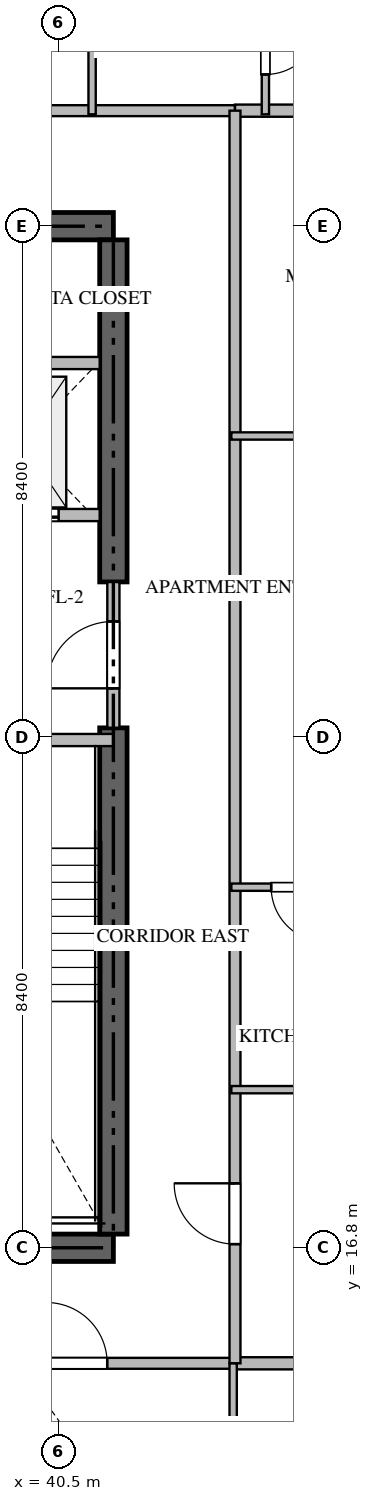
"""IFC4 building model, lengths in metres.
Left out: names, types, materials, properties, quantities, classifications, styles, units other than length and angle.
Written with IfcOpenShell. Run it as: python <this file> out.ifc"""

import sys

from ifc_helpers import new_model, si_unit, direction, frame, frame_2d, origin, place, context, subcontext, project, spatial, rectangle, extrude, source, transform, mapped, element, fill, save


model = new_model("IFC4")
c1 = context("Model", 3, precision=1e-05, world=origin(), true_north=direction((0.0, 1.0)))
c2 = subcontext(c1, "Body", "Model", "MODEL_VIEW")
j1 = project(units=[si_unit("LENGTHUNIT", "METRE"), si_unit("PLANEANGLEUNIT", "RADIAN")], contexts=[c1])
p1 = place(None, origin())
s1 = spatial("IfcSite", under=j1, at=p1, CompositionType="ELEMENT")
p2 = place(p1, origin())
s2 = spatial("IfcBuilding", under=s1, at=p2, CompositionType="ELEMENT")
p3 = place(p2, frame((0.0, 0.0, 71.7)))
s3 = spatial("IfcBuildingStorey", under=s2, at=p3, CompositionType="ELEMENT", Elevation=71.7)
for number, where, z_axis, x_axis in (
    (1, (23.4, 16.8, -0.26), (0.0, 0.0, 1.0), (1.0, 0.0, 0.0)),
    (2, (41.4, 33.6, -0.26), (0.0, 0.0, 1.0), (-1.0, 0.0, 0.0)),
):
    element("IfcWall", number, at=place(p3, frame(where, z_axis=z_axis, x_axis=x_axis)), inside=s3, PredefinedType="SHEAR", context=c2, shape_type="SweptSolid", body=[
        extrude(rectangle(XDim=18.0, YDim=0.45, at=frame_2d((9.0, 0.0))), origin(), (0.0, 0.0, 1.0), 3.748),
    ])
p4 = place(p3, frame((41.4, 17.025, -0.26), z_axis=(0.0, 0.0, 1.0), x_axis=(0.0, 1.0, 0.0)))
e3 = element("IfcWall", 3, at=p4, inside=s3, PredefinedType="SHEAR", context=c2, shape_type="SweptSolid", body=[
    extrude(rectangle(XDim=8.325, YDim=0.45, at=frame_2d((4.163, 0.0))), origin(), (0.0, 0.0, 1.0), 3.748),
])
p5 = place(p3, frame((41.4, 27.75, -0.26), z_axis=(0.0, 0.0, 1.0), x_axis=(0.0, 1.0, 0.0)))
e4 = element("IfcWall", 4, at=p5, inside=s3, PredefinedType="SHEAR", context=c2, shape_type="SweptSolid", body=[
    extrude(rectangle(XDim=5.625, YDim=0.45, at=frame_2d((2.812, 0.0))), origin(), (0.0, 0.0, 1.0), 3.748),
])
p6 = place(p3, frame((36.95, 25.15, 0.0), z_axis=(0.0, 0.0, 1.0), x_axis=(1.0, 0.0, 0.0)))
e5 = element("IfcWall", 5, at=p6, inside=s3, PredefinedType="STANDARD", context=c2, shape_type="SweptSolid", body=[
    extrude(rectangle(XDim=4.45, YDim=0.2, at=frame_2d((2.225, 0.0))), origin(), (0.0, 0.0, 1.0), 3.49),
])
p7 = place(p6, frame((1.65, 0.0, 0.0)))
e6 = element("IfcOpeningElement", 6, at=p7, cuts=e5, PredefinedType="OPENING", context=c2, shape_type="SweptSolid", body=[
    extrude(rectangle(XDim=1.1, YDim=2.15, at=frame_2d((0.55, 1.075))), frame((0.0, 0.11, 0.0), z_axis=(0.0, -1.0, 0.0), x_axis=(1.0, 0.0, 0.0)), (0.0, 0.0, 1.0), 0.22),
])
p8 = place(p3, frame((38.75, 28.85, 0.0), z_axis=(0.0, 0.0, 1.0), x_axis=(1.0, 0.0, 0.0)))
e7 = element("IfcWall", 7, at=p8, inside=s3, PredefinedType="STANDARD", context=c2, shape_type="SweptSolid", body=[
    extrude(rectangle(XDim=2.425, YDim=0.2, at=frame_2d((1.212, 0.0))), origin(), (0.0, 0.0, 1.0), 3.49),
])
p9 = place(p8, frame((0.55, 0.0, 0.0)))
e8 = element("IfcOpeningElement", 8, at=p9, cuts=e7, PredefinedType="OPENING", context=c2, shape_type="SweptSolid", body=[
    extrude(rectangle(XDim=1.2, YDim=2.2, at=frame_2d((0.6, 1.1))), frame((0.0, 0.11, 0.0), z_axis=(0.0, -1.0, 0.0), x_axis=(1.0, 0.0, 0.0)), (0.0, 0.0, 1.0), 0.22),
])
p10 = place(p3, frame((38.75, 31.35, 0.0), z_axis=(0.0, 0.0, 1.0), x_axis=(1.0, 0.0, 0.0)))
e9 = element("IfcWall", 9, at=p10, inside=s3, PredefinedType="STANDARD", context=c2, shape_type="SweptSolid", body=[
    extrude(rectangle(XDim=2.425, YDim=0.2, at=frame_2d((1.212, 0.0))), origin(), (0.0, 0.0, 1.0), 3.49),
])
p11 = place(p3, frame((41.4, 25.352, 0.0), z_axis=(0.0, 0.0, 1.0), x_axis=(0.0, 1.0, 0.0)))
e10 = element("IfcWall", 10, at=p11, inside=s3, PredefinedType="STANDARD", context=c2, shape_type="SweptSolid", body=[
    extrude(rectangle(XDim=2.396, YDim=0.2, at=frame_2d((1.198, 0.0))), origin(), (0.0, 0.0, 1.0), 3.49),
])
p12 = place(p11, frame((0.648, 0.0, 0.0)))
e11 = element("IfcOpeningElement", 11, at=p12, cuts=e10, PredefinedType="OPENING", context=c2, shape_type="SweptSolid", body=[
    extrude(rectangle(XDim=1.1, YDim=2.15, at=frame_2d((0.55, 1.075))), frame((0.0, 0.11, 0.0), z_axis=(0.0, -1.0, 0.0), x_axis=(1.0, 0.0, 0.0)), (0.0, 0.0, 1.0), 0.22),
])
for number, where, z_axis, x_axis in (
    (12, (43.4, 14.9, 0.0), (0.0, 0.0, 1.0), (1.0, 0.0, 0.0)),
    (13, (43.4, 35.5, 0.0), (0.0, 0.0, 1.0), (1.0, 0.0, 0.0)),
):
    element("IfcWall", number, at=place(p3, frame(where, z_axis=z_axis, x_axis=x_axis)), inside=s3, PredefinedType="PARTITIONING", context=c2, shape_type="SweptSolid", body=[
        extrude(rectangle(XDim=15.318, YDim=0.2, at=frame_2d((7.659, 0.0))), origin(), (0.0, 0.0, 1.0), 3.49),
    ])
p13 = place(p3, frame((21.402, 14.9, 0.0), z_axis=(0.0, 0.0, 1.0), x_axis=(1.0, 0.0, 0.0)))
e14 = element("IfcWall", 14, at=p13, inside=s3, PredefinedType="PARTITIONING", context=c2, shape_type="SweptSolid", body=[
    extrude(rectangle(XDim=21.996, YDim=0.18, at=frame_2d((10.998, 0.0))), origin(), (0.0, 0.0, 1.0), 3.49),
])
p14 = place(p13, frame((2.1, 0.0, 0.0)))
e15 = element("IfcOpeningElement", 15, at=p14, cuts=e14, PredefinedType="OPENING", context=c2, shape_type="SweptSolid", body=[
    extrude(rectangle(XDim=1.0, YDim=2.15, at=frame_2d((0.5, 1.075))), frame((0.0, 0.1, 0.0), z_axis=(0.0, -1.0, 0.0), x_axis=(1.0, 0.0, 0.0)), (0.0, 0.0, 1.0), 0.2),
])
p15 = place(p13, frame((6.173, 0.0, 0.0)))
e16 = element("IfcOpeningElement", 16, at=p15, cuts=e14, PredefinedType="OPENING", context=c2, shape_type="SweptSolid", body=[
    extrude(rectangle(XDim=1.0, YDim=2.15, at=frame_2d((0.5, 1.075))), frame((0.0, 0.1, 0.0), z_axis=(0.0, -1.0, 0.0), x_axis=(1.0, 0.0, 0.0)), (0.0, 0.0, 1.0), 0.2),
])
p16 = place(p13, frame((18.896, 0.0, 0.0)))
e17 = element("IfcOpeningElement", 17, at=p16, cuts=e14, PredefinedType="OPENING", context=c2, shape_type="SweptSolid", body=[
    extrude(rectangle(XDim=1.0, YDim=2.15, at=frame_2d((0.5, 1.075))), frame((0.0, 0.1, 0.0), z_axis=(0.0, -1.0, 0.0), x_axis=(1.0, 0.0, 0.0)), (0.0, 0.0, 1.0), 0.2),
])
p17 = place(p3, frame((21.402, 35.5, 0.0), z_axis=(0.0, 0.0, 1.0), x_axis=(1.0, 0.0, 0.0)))
e18 = element("IfcWall", 18, at=p17, inside=s3, PredefinedType="PARTITIONING", context=c2, shape_type="SweptSolid", body=[
    extrude(rectangle(XDim=21.996, YDim=0.18, at=frame_2d((10.998, 0.0))), origin(), (0.0, 0.0, 1.0), 3.49),
])
p18 = place(p17, frame((5.774, 0.0, 0.0)))
e19 = element("IfcOpeningElement", 19, at=p18, cuts=e18, PredefinedType="OPENING", context=c2, shape_type="SweptSolid", body=[
    extrude(rectangle(XDim=1.0, YDim=2.15, at=frame_2d((0.5, 1.075))), frame((0.0, 0.1, 0.0), z_axis=(0.0, -1.0, 0.0), x_axis=(1.0, 0.0, 0.0)), (0.0, 0.0, 1.0), 0.2),
])
p19 = place(p17, frame((16.272, 0.0, 0.0)))
e20 = element("IfcOpeningElement", 20, at=p19, cuts=e18, PredefinedType="OPENING", context=c2, shape_type="SweptSolid", body=[
    extrude(rectangle(XDim=1.0, YDim=2.15, at=frame_2d((0.5, 1.075))), frame((0.0, 0.1, 0.0), z_axis=(0.0, -1.0, 0.0), x_axis=(1.0, 0.0, 0.0)), (0.0, 0.0, 1.0), 0.2),
])
p20 = place(p3, frame((43.4, 14.9, 0.0), z_axis=(0.0, 0.0, 1.0), x_axis=(0.0, 1.0, 0.0)))
e21 = element("IfcWall", 21, at=p20, inside=s3, PredefinedType="PARTITIONING", context=c2, shape_type="SweptSolid", body=[
    extrude(rectangle(XDim=20.6, YDim=0.18, at=frame_2d((10.3, 0.0))), origin(), (0.0, 0.0, 1.0), 3.49),
])
p21 = place(p20, frame((1.96, 0.0, 0.0)))
e22 = element("IfcOpeningElement", 22, at=p21, cuts=e21, PredefinedType="OPENING", context=c2, shape_type="SweptSolid", body=[
    extrude(rectangle(XDim=1.0, YDim=2.15, at=frame_2d((0.5, 1.075))), frame((0.0, 0.1, 0.0), z_axis=(0.0, -1.0, 0.0), x_axis=(1.0, 0.0, 0.0)), (0.0, 0.0, 1.0), 0.2),
])
p22 = place(p3, frame((43.37, 12.15, 0.0), z_axis=(0.0, 0.0, 1.0), x_axis=(0.0, 1.0, 0.0)))
e23 = element("IfcWall", 23, at=p22, inside=s3, PredefinedType="PARTITIONING", context=c2, shape_type="SweptSolid", body=[
    extrude(rectangle(XDim=2.748, YDim=0.12, at=frame_2d((1.374, 0.0))), origin(), (0.0, 0.0, 1.0), 3.49),
])
p23 = place(p3, frame((41.05, 38.25, 0.0), z_axis=(0.0, 0.0, 1.0), x_axis=(0.0, -1.0, 0.0)))
e24 = element("IfcWall", 24, at=p23, inside=s3, PredefinedType="PARTITIONING", context=c2, shape_type="SweptSolid", body=[
    extrude(rectangle(XDim=2.81, YDim=0.12, at=frame_2d((1.405, 0.0))), origin(), (0.0, 0.0, 1.0), 3.49),
])
p24 = place(p3, frame((43.9, 37.65, 0.0), z_axis=(0.0, 0.0, 1.0), x_axis=(0.0, -1.0, 0.0)))
e25 = element("IfcWall", 25, at=p24, inside=s3, PredefinedType="PARTITIONING", context=c2, shape_type="SweptSolid", body=[
    extrude(rectangle(XDim=2.21, YDim=0.12, at=frame_2d((1.105, 0.0))), origin(), (0.0, 0.0, 1.0), 3.49),
])
p25 = place(p24, frame((0.655, 0.0, 0.0)))
e26 = element("IfcOpeningElement", 26, at=p25, cuts=e25, PredefinedType="OPENING", context=c2, shape_type="SweptSolid", body=[
    extrude(rectangle(XDim=0.9, YDim=2.1, at=frame_2d((0.45, 1.05))), frame((0.0, 0.07, 0.0), z_axis=(0.0, -1.0, 0.0), x_axis=(1.0, 0.0, 0.0)), (0.0, 0.0, 1.0), 0.14),
])
p26 = place(p3, frame((46.15, 19.4, 0.0), z_axis=(0.0, 0.0, 1.0), x_axis=(-1.0, 0.0, 0.0)))
e27 = element("IfcWall", 27, at=p26, inside=s3, PredefinedType="PARTITIONING", context=c2, shape_type="SweptSolid", body=[
    extrude(rectangle(XDim=2.81, YDim=0.12, at=frame_2d((1.405, 0.0))), origin(), (0.0, 0.0, 1.0), 3.49),
])
p27 = place(p3, frame((45.55, 22.73, 0.0), z_axis=(0.0, 0.0, 1.0), x_axis=(-1.0, 0.0, 0.0)))
e28 = element("IfcWall", 28, at=p27, inside=s3, PredefinedType="PARTITIONING", context=c2, shape_type="SweptSolid", body=[
    extrude(rectangle(XDim=2.21, YDim=0.12, at=frame_2d((1.105, 0.0))), origin(), (0.0, 0.0, 1.0), 3.49),
])
p28 = place(p27, frame((0.655, 0.0, 0.0)))
e29 = element("IfcOpeningElement", 29, at=p28, cuts=e28, PredefinedType="OPENING", context=c2, shape_type="SweptSolid", body=[
    extrude(rectangle(XDim=0.9, YDim=2.1, at=frame_2d((0.45, 1.05))), frame((0.0, 0.07, 0.0), z_axis=(0.0, -1.0, 0.0), x_axis=(1.0, 0.0, 0.0)), (0.0, 0.0, 1.0), 0.14),
])
p29 = place(p3, frame((45.548, 30.15, 0.0), z_axis=(0.0, 0.0, 1.0), x_axis=(-1.0, 0.0, 0.0)))
e30 = element("IfcWall", 30, at=p29, inside=s3, PredefinedType="PARTITIONING", context=c2, shape_type="SweptSolid", body=[
    extrude(rectangle(XDim=2.208, YDim=0.12, at=frame_2d((1.104, 0.0))), origin(), (0.0, 0.0, 1.0), 3.49),
])
m1 = source(origin(), c2, "Body", "SweptSolid", [
    extrude(rectangle(XDim=1.2, YDim=2.2, at=frame_2d((0.6, 1.1))), frame((0.0, 0.025, 0.0), z_axis=(0.0, -1.0, 0.0), x_axis=(1.0, 0.0, 0.0)), (0.0, 0.0, 1.0), 0.05),
])
p30 = place(p9, origin())
e31 = element("IfcDoor", 31, at=p30, inside=s3, OperationType="DOUBLE_DOOR_SLIDING", PredefinedType="DOOR", context=c2, shape_type="MappedRepresentation", body=[
    mapped(m1, transform((0.0, 0.0, 0.0), scale=1.0)),
])
fill(e8, e31)
m2 = source(origin(), c2, "Body", "SweptSolid", [
    extrude(rectangle(XDim=1.1, YDim=2.15, at=frame_2d((0.55, 1.075))), frame((0.0, 0.025, 0.0), z_axis=(0.0, -1.0, 0.0), x_axis=(1.0, 0.0, 0.0)), (0.0, 0.0, 1.0), 0.05),
])
p31 = place(p12, origin())
e32 = element("IfcDoor", 32, at=p31, inside=s3, OperationType="SINGLE_SWING_LEFT", PredefinedType="DOOR", context=c2, shape_type="MappedRepresentation", body=[
    mapped(m2, transform((0.0, 0.0, 0.0), scale=1.0)),
])
fill(e11, e32)
m3 = source(origin(), c2, "Body", "SweptSolid", [
    extrude(rectangle(XDim=1.0, YDim=2.15, at=frame_2d((0.5, 1.075))), frame((0.0, 0.025, 0.0), z_axis=(0.0, -1.0, 0.0), x_axis=(1.0, 0.0, 0.0)), (0.0, 0.0, 1.0), 0.05),
])
p32 = place(p16, origin())
e33 = element("IfcDoor", 33, at=p32, inside=s3, OperationType="SINGLE_SWING_LEFT", PredefinedType="DOOR", context=c2, shape_type="MappedRepresentation", body=[
    mapped(m3, transform((0.0, 0.0, 0.0), scale=1.0)),
])
fill(e17, e33)
p33 = place(p21, origin())
e34 = element("IfcDoor", 34, at=p33, inside=s3, OperationType="SINGLE_SWING_RIGHT", PredefinedType="DOOR", context=c2, shape_type="MappedRepresentation", body=[
    mapped(m3, transform((0.0, 0.0, 0.0), scale=1.0)),
])
fill(e22, e34)
m4 = source(origin(), c2, "Body", "SweptSolid", [
    extrude(rectangle(XDim=0.9, YDim=2.1, at=frame_2d((0.45, 1.05))), frame((0.0, 0.025, 0.0), z_axis=(0.0, -1.0, 0.0), x_axis=(1.0, 0.0, 0.0)), (0.0, 0.0, 1.0), 0.05),
])
p34 = place(p25, origin())
e35 = element("IfcDoor", 35, at=p34, inside=s3, OperationType="SINGLE_SWING_LEFT", PredefinedType="DOOR", context=c2, shape_type="MappedRepresentation", body=[
    mapped(m4, transform((0.0, 0.0, 0.0), scale=1.0)),
])
fill(e26, e35)
p35 = place(p28, origin())
e36 = element("IfcDoor", 36, at=p35, inside=s3, OperationType="SINGLE_SWING_LEFT", PredefinedType="DOOR", context=c2, shape_type="MappedRepresentation", body=[
    mapped(m4, transform((0.0, 0.0, 0.0), scale=1.0)),
])
fill(e29, e36)
save(model, sys.argv[1])
